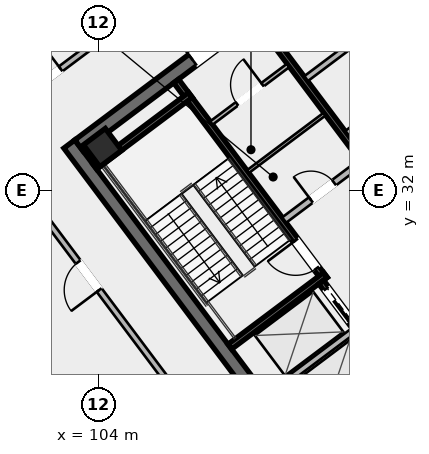
"""IFC4 building model, lengths in metres.
Left out: names, types, materials, properties, quantities, classifications, styles, units other than length and angle.
Written with IfcOpenShell. Run it as: python <this file> out.ifc"""

import sys

from ifc_helpers import new_model, si_unit, direction, frame, frame_2d, origin, origin_2d, place, context, subcontext, project, spatial, rectangle, hollow_rectangle, extrude, element, fill, save


model = new_model("IFC4")
c1 = context("Model", 3, precision=1e-05, world=origin(), true_north=direction((0.0, 1.0)))
c2 = subcontext(c1, "Body", "Model", "MODEL_VIEW")
j1 = project(units=[si_unit("LENGTHUNIT", "METRE"), si_unit("PLANEANGLEUNIT", "RADIAN")], contexts=[c1])
p1 = place(None, origin())
s1 = spatial("IfcSite", under=j1, at=p1, CompositionType="ELEMENT")
p2 = place(p1, origin())
s2 = spatial("IfcBuilding", under=s1, at=p2, CompositionType="ELEMENT")
p3 = place(p2, frame((0.0, 0.0, 199.6)))
s3 = spatial("IfcBuildingStorey", under=s2, at=p3, CompositionType="ELEMENT", Elevation=199.6)
p4 = place(p3, frame((112.396, 21.047, 0.0), z_axis=(0.0, 0.0, 1.0), x_axis=(-0.600005007985, 0.799996243986, 0.0)))
e1 = element("IfcWall", 1, at=p4, inside=s3, PredefinedType="SHEAR", context=c2, shape_type="SweptSolid", body=[
    extrude(rectangle(XDim=15.6, YDim=0.45, at=frame_2d((7.8, 0.0))), origin(), (0.0, 0.0, 1.0), 4.6),
])
p5 = place(p3, frame((103.351, 33.482, 0.0), z_axis=(0.0, 0.0, 1.0), x_axis=(0.8, 0.6, 0.0)))
e2 = element("IfcWall", 2, at=p5, inside=s3, PredefinedType="SHEAR", context=c2, shape_type="SweptSolid", body=[
    extrude(rectangle(XDim=15.26, YDim=0.45, at=frame_2d((7.63, 0.0))), origin(), (0.0, 0.0, 1.0), 4.6),
])
p6 = place(p5, frame((4.68, 0.0, 0.0)))
e3 = element("IfcOpeningElement", 3, at=p6, cuts=e2, PredefinedType="OPENING", context=c2, shape_type="SweptSolid", body=[
    extrude(rectangle(XDim=1.25, YDim=2.25, at=frame_2d((0.625, 1.125))), frame((0.0, 0.235, 0.0), z_axis=(0.0, -1.0, 0.0), x_axis=(1.0, 0.0, 0.0)), (0.0, 0.0, 1.0), 0.47),
])
p7 = place(p5, frame((9.73, 0.0, 0.0)))
e4 = element("IfcOpeningElement", 4, at=p7, cuts=e2, PredefinedType="OPENING", context=c2, shape_type="SweptSolid", body=[
    extrude(rectangle(XDim=1.25, YDim=2.25, at=frame_2d((0.625, 1.125))), frame((0.0, 0.235, 0.0), z_axis=(0.0, -1.0, 0.0), x_axis=(1.0, 0.0, 0.0)), (0.0, 0.0, 1.0), 0.47),
])
p8 = place(p3, frame((104.13, 33.41, 0.0), z_axis=(0.0, 0.0, 1.0), x_axis=(0.799999996291, 0.600000004945, 0.0)))
e5 = element("IfcColumn", 5, at=p8, inside=s3, PredefinedType="COLUMN", context=c2, shape_type="SweptSolid", body=[
    extrude(hollow_rectangle(XDim=0.9, YDim=0.9, WallThickness=0.04, at=origin_2d()), origin(), (0.0, 0.0, 1.0), 4.42),
])
for number, where, z_axis, x_axis in (
    (6, (109.704, 11.928, 0.0), (0.0, 0.0, 1.0), (-0.6, 0.8, 0.0)),
    (7, (93.928, 36.296, 0.0), (0.0, 0.0, 1.0), (0.8, 0.6, 0.0)),
):
    element("IfcWall", number, at=place(p3, frame(where, z_axis=z_axis, x_axis=x_axis)), inside=s3, PredefinedType="SOLIDWALL", context=c2, shape_type="SweptSolid", body=[
        extrude(rectangle(XDim=26.96, YDim=0.28, at=frame_2d((13.48, 0.0))), origin(), (0.0, 0.0, 1.0), 4.42),
    ])
p9 = place(p3, frame((111.44, 29.08, 0.0), z_axis=(0.0, 0.0, 1.0), x_axis=(-0.59999041401, 0.800007189403, 0.0)))
e8 = element("IfcWall", 8, at=p9, inside=s3, PredefinedType="SHEAR", context=c2, shape_type="SweptSolid", body=[
    extrude(rectangle(XDim=8.15, YDim=0.2, at=frame_2d((4.075, 0.0))), origin(), (0.0, 0.0, 1.0), 4.42),
])
p10 = place(p9, frame((0.45, 0.0, 0.0)))
e9 = element("IfcOpeningElement", 9, at=p10, cuts=e8, PredefinedType="OPENING", context=c2, shape_type="SweptSolid", body=[
    extrude(rectangle(XDim=1.15, YDim=2.2, at=frame_2d((0.575, 1.1))), frame((0.0, 0.11, 0.0), z_axis=(0.0, -1.0, 0.0), x_axis=(1.0, 0.0, 0.0)), (0.0, 0.0, 1.0), 0.22),
])
for number, where, z_axis, x_axis in (
    (10, (108.316, 26.862, 0.0), (0.0, 0.0, 1.0), (0.8, 0.6, 0.0)),
    (11, (103.876, 32.782, 0.0), (0.0, 0.0, 1.0), (0.8, 0.6, 0.0)),
):
    element("IfcWall", number, at=place(p3, frame(where, z_axis=z_axis, x_axis=x_axis)), inside=s3, PredefinedType="SHEAR", context=c2, shape_type="SweptSolid", body=[
        extrude(rectangle(XDim=3.93, YDim=0.2, at=frame_2d((1.965, 0.0))), origin(), (0.0, 0.0, 1.0), 4.42),
    ])
p11 = place(p3, frame((118.058, 25.856, 0.0), z_axis=(0.0, 0.0, 1.0), x_axis=(-0.600002657301, 0.799998007018, 0.0)))
e12 = element("IfcWall", 12, at=p11, inside=s3, PredefinedType="SHEAR", context=c2, shape_type="SweptSolid", body=[
    extrude(rectangle(XDim=14.7, YDim=0.2, at=frame_2d((7.35, 0.0))), origin(), (0.0, 0.0, 1.0), 4.42),
])
p12 = place(p3, frame((110.104, 31.028, 0.0), z_axis=(0.0, 0.0, 1.0), x_axis=(0.800018601094, 0.59997519774, 0.0)))
e13 = element("IfcWall", 13, at=p12, inside=s3, PredefinedType="SOLIDWALL", context=c2, shape_type="SweptSolid", body=[
    extrude(rectangle(XDim=3.15, YDim=0.22, at=frame_2d((1.575, 0.0))), origin(), (0.0, 0.0, 1.0), 3.531),
])
p13 = place(p12, frame((1.1, 0.0, 0.0)))
e14 = element("IfcOpeningElement", 14, at=p13, cuts=e13, PredefinedType="OPENING", context=c2, shape_type="SweptSolid", body=[
    extrude(rectangle(XDim=0.95, YDim=2.05, at=frame_2d((0.475, 1.025))), frame((0.0, 0.12, 0.0), z_axis=(0.0, -1.0, 0.0), x_axis=(1.0, 0.0, 0.0)), (0.0, 0.0, 1.0), 0.24),
])
p14 = place(p3, frame((115.25, 23.75, 0.0), z_axis=(0.0, 0.0, 1.0), x_axis=(-0.599994036198, 0.800004472816, 0.0)))
e15 = element("IfcWall", 15, at=p14, inside=s3, PredefinedType="SHEAR", context=c2, shape_type="SweptSolid", body=[
    extrude(rectangle(XDim=6.55, YDim=0.2, at=frame_2d((3.275, 0.0))), origin(), (0.0, 0.0, 1.0), 4.42),
])
p15 = place(p14, frame((4.975, 0.0, 0.0)))
e16 = element("IfcOpeningElement", 16, at=p15, cuts=e15, PredefinedType="OPENING", context=c2, shape_type="SweptSolid", body=[
    extrude(rectangle(XDim=1.3, YDim=2.25, at=frame_2d((0.65, 1.125))), frame((0.0, 0.11, 0.0), z_axis=(0.0, -1.0, 0.0), x_axis=(1.0, 0.0, 0.0)), (0.0, 0.0, 1.0), 0.22),
])
p16 = place(p14, frame((2.975, 0.0, 0.0)))
e17 = element("IfcOpeningElement", 17, at=p16, cuts=e15, PredefinedType="OPENING", context=c2, shape_type="SweptSolid", body=[
    extrude(rectangle(XDim=1.3, YDim=2.25, at=frame_2d((0.65, 1.125))), frame((0.0, 0.11, 0.0), z_axis=(0.0, -1.0, 0.0), x_axis=(1.0, 0.0, 0.0)), (0.0, 0.0, 1.0), 0.22),
])
p17 = place(p14, frame((0.775, 0.0, 0.0)))
e18 = element("IfcOpeningElement", 18, at=p17, cuts=e15, PredefinedType="OPENING", context=c2, shape_type="SweptSolid", body=[
    extrude(rectangle(XDim=1.3, YDim=2.25, at=frame_2d((0.65, 1.125))), frame((0.0, 0.11, 0.0), z_axis=(0.0, -1.0, 0.0), x_axis=(1.0, 0.0, 0.0)), (0.0, 0.0, 1.0), 0.22),
])
p18 = place(p3, frame((109.528, 25.246, 0.0), z_axis=(0.0, 0.0, 1.0), x_axis=(0.800008183455, 0.599989088572, 0.0)))
e19 = element("IfcWall", 19, at=p18, inside=s3, PredefinedType="SOLIDWALL", context=c2, shape_type="SweptSolid", body=[
    extrude(rectangle(XDim=3.58, YDim=0.2, at=frame_2d((1.79, 0.0))), origin(), (0.0, 0.0, 1.0), 4.42),
])
p19 = place(p3, frame((107.71, 34.22, 0.0), z_axis=(0.0, 0.0, 1.0), x_axis=(0.799981399002, 0.60002480053, 0.0)))
e20 = element("IfcWall", 20, at=p19, inside=s3, PredefinedType="PARTITIONING", context=c2, shape_type="SweptSolid", body=[
    extrude(rectangle(XDim=3.15, YDim=0.135, at=frame_2d((1.575, 0.0))), origin(), (0.0, 0.0, 1.0), 3.531),
])
p20 = place(p19, frame((1.05, 0.0, 0.0)))
e21 = element("IfcOpeningElement", 21, at=p20, cuts=e20, PredefinedType="OPENING", context=c2, shape_type="SweptSolid", body=[
    extrude(rectangle(XDim=1.05, YDim=2.2, at=frame_2d((0.525, 1.1))), frame((0.0, 0.077, 0.0), z_axis=(0.0, -1.0, 0.0), x_axis=(1.0, 0.0, 0.0)), (0.0, 0.0, 1.0), 0.155),
])
p21 = place(p3, frame((108.91, 32.62, 0.0), z_axis=(0.0, 0.0, 1.0), x_axis=(0.800018601094, 0.59997519774, 0.0)))
e22 = element("IfcWall", 22, at=p21, inside=s3, PredefinedType="PARTITIONING", context=c2, shape_type="SweptSolid", body=[
    extrude(rectangle(XDim=3.15, YDim=0.11, at=frame_2d((1.575, 0.0))), origin(), (0.0, 0.0, 1.0), 3.531),
])
p22 = place(p3, frame((115.11, 33.27, 0.0), z_axis=(0.0, 0.0, 1.0), x_axis=(-0.600011160345, 0.79999162962, 0.0)))
e23 = element("IfcWall", 23, at=p22, inside=s3, PredefinedType="SOLIDWALL", context=c2, shape_type="SweptSolid", body=[
    extrude(rectangle(XDim=7.0, YDim=0.2, at=frame_2d((3.5, 0.0))), origin(), (0.0, 0.0, 1.0), 4.42),
])
p23 = place(p3, frame((112.176, 33.882, 0.0), z_axis=(0.0, 0.0, 1.0), x_axis=(0.8, 0.6, 0.0)))
e24 = element("IfcWall", 24, at=p23, inside=s3, PredefinedType="SOLIDWALL", context=c2, shape_type="SweptSolid", body=[
    extrude(rectangle(XDim=1.88, YDim=0.2, at=frame_2d((0.94, 0.0))), origin(), (0.0, 0.0, 1.0), 4.42),
])
p24 = place(p3, frame((110.826, 35.682, 0.0), z_axis=(0.0, 0.0, 1.0), x_axis=(0.799984418148, 0.600020775241, 0.0)))
e25 = element("IfcWall", 25, at=p24, inside=s3, PredefinedType="SOLIDWALL", context=c2, shape_type="SweptSolid", body=[
    extrude(rectangle(XDim=1.88, YDim=0.2, at=frame_2d((0.94, 0.0))), origin(), (0.0, 0.0, 1.0), 4.42),
])
p25 = place(p3, frame((100.07, 33.99, 0.0), z_axis=(0.0, 0.0, 1.0), x_axis=(0.8, 0.6, 0.0)))
e26 = element("IfcWall", 26, at=p25, inside=s3, PredefinedType="SOLIDWALL", context=c2, shape_type="SweptSolid", body=[
    extrude(rectangle(XDim=19.9, YDim=0.2, at=frame_2d((9.95, 0.0))), origin(), (0.0, 0.0, 1.0), 3.531),
])
p26 = place(p25, frame((2.2, 0.0, 0.0)))
e27 = element("IfcOpeningElement", 27, at=p26, cuts=e26, PredefinedType="OPENING", context=c2, shape_type="SweptSolid", body=[
    extrude(rectangle(XDim=1.15, YDim=2.2, at=frame_2d((0.575, 1.1))), frame((0.0, 0.11, 0.0), z_axis=(0.0, -1.0, 0.0), x_axis=(1.0, 0.0, 0.0)), (0.0, 0.0, 1.0), 0.22),
])
p27 = place(p3, frame((127.93, 30.01, 0.0), z_axis=(0.0, 0.0, 1.0), x_axis=(-0.8, -0.6, 0.0)))
e28 = element("IfcWall", 28, at=p27, inside=s3, PredefinedType="SOLIDWALL", context=c2, shape_type="SweptSolid", body=[
    extrude(rectangle(XDim=19.9, YDim=0.2, at=frame_2d((9.95, 0.0))), origin(), (0.0, 0.0, 1.0), 3.531),
])
p28 = place(p27, frame((2.2, 0.0, 0.0)))
e29 = element("IfcOpeningElement", 29, at=p28, cuts=e28, PredefinedType="OPENING", context=c2, shape_type="SweptSolid", body=[
    extrude(rectangle(XDim=1.15, YDim=2.2, at=frame_2d((0.575, 1.1))), frame((0.0, 0.11, 0.0), z_axis=(0.0, -1.0, 0.0), x_axis=(1.0, 0.0, 0.0)), (0.0, 0.0, 1.0), 0.22),
])
p29 = place(p3, frame((111.938, 18.166, 0.0), z_axis=(0.0, 0.0, 1.0), x_axis=(-0.59999602618, 0.80000298035, 0.0)))
e30 = element("IfcWall", 30, at=p29, inside=s3, PredefinedType="SOLIDWALL", context=c2, shape_type="SweptSolid", body=[
    extrude(rectangle(XDim=19.66, YDim=0.2, at=frame_2d((9.83, 0.0))), origin(), (0.0, 0.0, 1.0), 3.531),
])
p30 = place(p29, frame((3.0, 0.0, 0.0)))
e31 = element("IfcOpeningElement", 31, at=p30, cuts=e30, PredefinedType="OPENING", context=c2, shape_type="SweptSolid", body=[
    extrude(rectangle(XDim=1.25, YDim=2.25, at=frame_2d((0.625, 1.125))), frame((0.0, 0.11, 0.0), z_axis=(0.0, -1.0, 0.0), x_axis=(1.0, 0.0, 0.0)), (0.0, 0.0, 1.0), 0.22),
])
p31 = place(p29, frame((13.2, 0.0, 0.0)))
e32 = element("IfcOpeningElement", 32, at=p31, cuts=e30, PredefinedType="OPENING", context=c2, shape_type="SweptSolid", body=[
    extrude(rectangle(XDim=1.15, YDim=2.2, at=frame_2d((0.575, 1.1))), frame((0.0, 0.11, 0.0), z_axis=(0.0, -1.0, 0.0), x_axis=(1.0, 0.0, 0.0)), (0.0, 0.0, 1.0), 0.22),
])
p32 = place(p6, origin())
e33 = element("IfcDoor", 33, at=p32, inside=s3, OperationType="SINGLE_SWING_LEFT", PredefinedType="DOOR", context=c2, shape_type="SweptSolid", body=[
    extrude(rectangle(XDim=1.25, YDim=2.25, at=frame_2d((0.625, 1.125))), frame((0.0, 0.025, 0.0), z_axis=(0.0, -1.0, 0.0), x_axis=(1.0, 0.0, 0.0)), (0.0, 0.0, 1.0), 0.05),
])
fill(e3, e33)
p33 = place(p10, origin())
e34 = element("IfcDoor", 34, at=p33, inside=s3, OperationType="SINGLE_SWING_RIGHT", PredefinedType="DOOR", context=c2, shape_type="SweptSolid", body=[
    extrude(rectangle(XDim=1.15, YDim=2.2, at=frame_2d((0.575, 1.1))), frame((0.0, 0.025, 0.0), z_axis=(0.0, -1.0, 0.0), x_axis=(1.0, 0.0, 0.0)), (0.0, 0.0, 1.0), 0.05),
])
fill(e9, e34)
p34 = place(p20, origin())
e35 = element("IfcDoor", 35, at=p34, inside=s3, OperationType="SINGLE_SWING_RIGHT", PredefinedType="DOOR", context=c2, shape_type="SweptSolid", body=[
    extrude(rectangle(XDim=1.05, YDim=2.2, at=frame_2d((0.525, 1.1))), frame((0.0, 0.025, 0.0), z_axis=(0.0, -1.0, 0.0), x_axis=(1.0, 0.0, 0.0)), (0.0, 0.0, 1.0), 0.05),
])
fill(e21, e35)
p35 = place(p13, origin())
e36 = element("IfcDoor", 36, at=p35, inside=s3, OperationType="SINGLE_SWING_LEFT", PredefinedType="DOOR", context=c2, shape_type="SweptSolid", body=[
    extrude(rectangle(XDim=0.95, YDim=2.05, at=frame_2d((0.475, 1.025))), frame((0.0, 0.025, 0.0), z_axis=(0.0, -1.0, 0.0), x_axis=(1.0, 0.0, 0.0)), (0.0, 0.0, 1.0), 0.05),
])
fill(e14, e36)
p36 = place(p26, origin())
e37 = element("IfcDoor", 37, at=p36, inside=s3, OperationType="SINGLE_SWING_RIGHT", PredefinedType="DOOR", context=c2, shape_type="SweptSolid", body=[
    extrude(rectangle(XDim=1.15, YDim=2.2, at=frame_2d((0.575, 1.1))), frame((0.0, 0.025, 0.0), z_axis=(0.0, -1.0, 0.0), x_axis=(1.0, 0.0, 0.0)), (0.0, 0.0, 1.0), 0.05),
])
fill(e27, e37)
p37 = place(p31, origin())
e38 = element("IfcDoor", 38, at=p37, inside=s3, OperationType="SINGLE_SWING_LEFT", PredefinedType="DOOR", context=c2, shape_type="SweptSolid", body=[
    extrude(rectangle(XDim=1.15, YDim=2.2, at=frame_2d((0.575, 1.1))), frame((0.0, 0.025, 0.0), z_axis=(0.0, -1.0, 0.0), x_axis=(1.0, 0.0, 0.0)), (0.0, 0.0, 1.0), 0.05),
])
fill(e32, e38)
p38 = place(p15, origin())
e39 = element("IfcDoor", 39, at=p38, inside=s3, OperationType="SLIDING_TO_LEFT", PredefinedType="DOOR", context=c2, shape_type="SweptSolid", body=[
    extrude(rectangle(XDim=1.3, YDim=2.25, at=frame_2d((0.65, 1.125))), frame((0.0, 0.025, 0.0), z_axis=(0.0, -1.0, 0.0), x_axis=(1.0, 0.0, 0.0)), (0.0, 0.0, 1.0), 0.05),
])
fill(e16, e39)
save(model, sys.argv[1])
